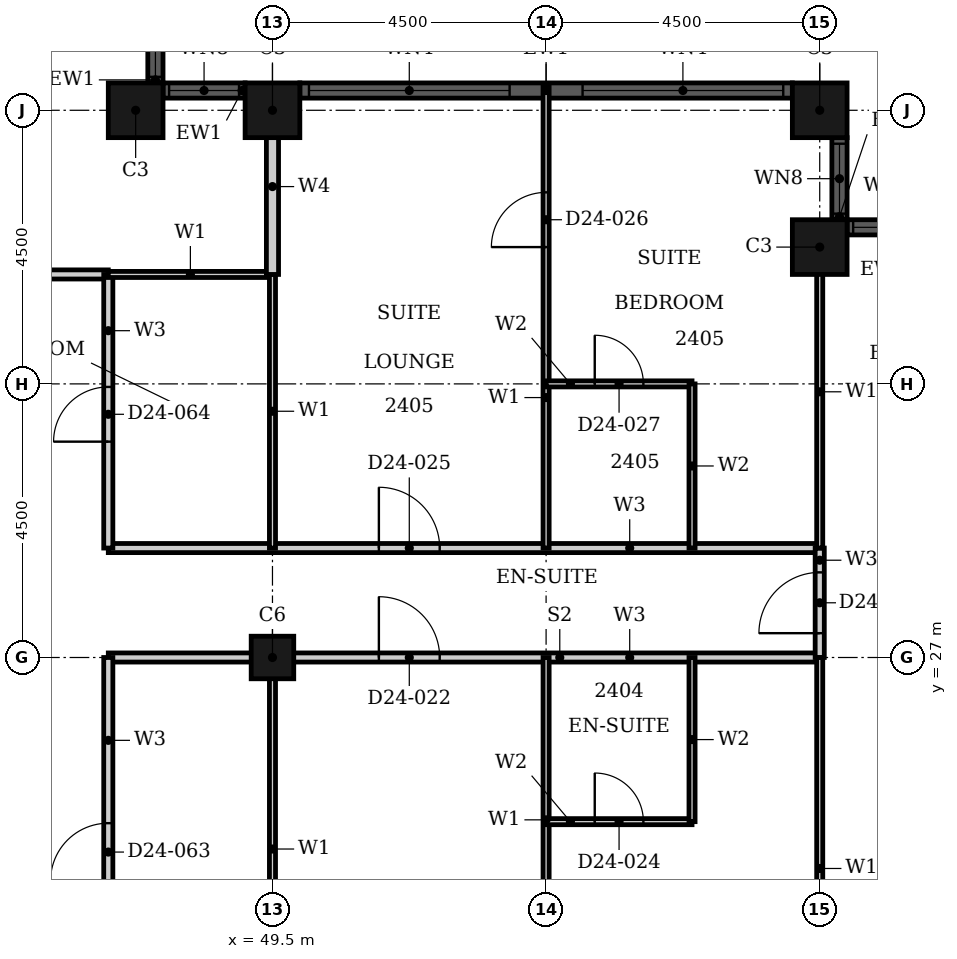
"""IFC4 building model, lengths in metres.
Left out: names, types, materials, properties, quantities, classifications, styles, units other than length and angle.
Written with IfcOpenShell. Run it as: python <this file> out.ifc"""

import sys

from ifc_helpers import new_model, si_unit, direction, frame, frame_2d, origin, origin_2d, place, context, subcontext, project, spatial, rectangle, hollow_rectangle, extrude, element, fill, save


model = new_model("IFC4")
c1 = context("Model", 3, precision=1e-05, world=origin(), true_north=direction((0.0, 1.0)))
c2 = subcontext(c1, "Body", "Model", "MODEL_VIEW")
j1 = project(units=[si_unit("LENGTHUNIT", "METRE"), si_unit("PLANEANGLEUNIT", "RADIAN")], contexts=[c1])
p1 = place(None, origin())
s1 = spatial("IfcSite", under=j1, at=p1, CompositionType="ELEMENT")
p2 = place(p1, origin())
s2 = spatial("IfcBuilding", under=s1, at=p2, CompositionType="ELEMENT")
p3 = place(p2, frame((0.0, 0.0, 100.8)))
s3 = spatial("IfcBuildingStorey", under=s2, at=p3, CompositionType="ELEMENT", Elevation=100.8)
for number, where, z_axis, x_axis in (
    (1, (58.5, 33.75, 0.0), (0.0, 0.0, 1.0), (1.0, 0.0, 0.0)),
    (2, (58.5, 36.0, 0.0), (0.0, 0.0, 1.0), (1.0, 0.0, 0.0)),
    (3, (49.5, 36.0, 0.0), (0.0, 0.0, 1.0), (1.0, 0.0, 0.0)),
    (4, (47.25, 36.0, 0.0), (0.0, 0.0, 1.0), (1.0, 0.0, 0.0)),
):
    element("IfcColumn", number, at=place(p3, frame(where, z_axis=z_axis, x_axis=x_axis)), inside=s3, PredefinedType="COLUMN", context=c2, shape_type="SweptSolid", body=[
        extrude(hollow_rectangle(XDim=0.9, YDim=0.9, WallThickness=0.028, at=origin_2d()), origin(), (0.0, 0.0, 1.0), 3.6),
    ])
p4 = place(p3, frame((49.5, 27.0, 0.0), z_axis=(0.0, 0.0, 1.0), x_axis=(1.0, 0.0, 0.0)))
e5 = element("IfcColumn", 5, at=p4, inside=s3, PredefinedType="COLUMN", context=c2, shape_type="SweptSolid", body=[
    extrude(hollow_rectangle(XDim=0.7, YDim=0.7, WallThickness=0.022, at=origin_2d()), origin(), (0.0, 0.0, 1.0), 3.6),
])
p5 = place(p3, frame((60.3, 34.075, 0.0), z_axis=(0.0, 0.0, 1.0), x_axis=(-1.0, 0.0, 0.0)))
e6 = element("IfcWall", 6, at=p5, inside=s3, PredefinedType="SOLIDWALL", context=c2, shape_type="SweptSolid", body=[
    extrude(rectangle(XDim=1.35, YDim=0.25, at=frame_2d((0.675, 0.0))), origin(), (0.0, 0.0, 1.0), 3.6),
])
p6 = place(p5, frame((0.1, 0.0, 0.9)))
e7 = element("IfcOpeningElement", 7, at=p6, cuts=e6, PredefinedType="OPENING", context=c2, shape_type="SweptSolid", body=[
    extrude(rectangle(XDim=1.15, YDim=2.08, at=frame_2d((0.575, 1.04))), frame((0.0, 0.135, 0.0), z_axis=(0.0, -1.0, 0.0), x_axis=(1.0, 0.0, 0.0)), (0.0, 0.0, 1.0), 0.27),
])
p7 = place(p3, frame((58.825, 34.2, 0.0), z_axis=(0.0, 0.0, 1.0), x_axis=(0.0, 1.0, 0.0)))
e8 = element("IfcWall", 8, at=p7, inside=s3, PredefinedType="SOLIDWALL", context=c2, shape_type="SweptSolid", body=[
    extrude(rectangle(XDim=1.35, YDim=0.25, at=frame_2d((0.675, 0.0))), origin(), (0.0, 0.0, 1.0), 3.6),
])
p8 = place(p7, frame((0.1, 0.0, 0.9)))
e9 = element("IfcOpeningElement", 9, at=p8, cuts=e8, PredefinedType="OPENING", context=c2, shape_type="SweptSolid", body=[
    extrude(rectangle(XDim=1.15, YDim=2.08, at=frame_2d((0.575, 1.04))), frame((0.0, 0.135, 0.0), z_axis=(0.0, -1.0, 0.0), x_axis=(1.0, 0.0, 0.0)), (0.0, 0.0, 1.0), 0.27),
])
p9 = place(p3, frame((58.05, 36.325, 0.0), z_axis=(0.0, 0.0, 1.0), x_axis=(-1.0, 0.0, 0.0)))
e10 = element("IfcWall", 10, at=p9, inside=s3, PredefinedType="SOLIDWALL", context=c2, shape_type="SweptSolid", body=[
    extrude(rectangle(XDim=8.1, YDim=0.25, at=frame_2d((4.05, 0.0))), origin(), (0.0, 0.0, 1.0), 3.6),
])
p10 = place(p9, frame((0.15, 0.0, 0.9)))
e11 = element("IfcOpeningElement", 11, at=p10, cuts=e10, PredefinedType="OPENING", context=c2, shape_type="SweptSolid", body=[
    extrude(rectangle(XDim=3.3, YDim=2.08, at=frame_2d((1.65, 1.04))), frame((0.0, 0.135, 0.0), z_axis=(0.0, -1.0, 0.0), x_axis=(1.0, 0.0, 0.0)), (0.0, 0.0, 1.0), 0.27),
])
p11 = place(p9, frame((4.65, 0.0, 0.9)))
e12 = element("IfcOpeningElement", 12, at=p11, cuts=e10, PredefinedType="OPENING", context=c2, shape_type="SweptSolid", body=[
    extrude(rectangle(XDim=3.3, YDim=2.08, at=frame_2d((1.65, 1.04))), frame((0.0, 0.135, 0.0), z_axis=(0.0, -1.0, 0.0), x_axis=(1.0, 0.0, 0.0)), (0.0, 0.0, 1.0), 0.27),
])
p12 = place(p3, frame((49.05, 36.325, 0.0), z_axis=(0.0, 0.0, 1.0), x_axis=(-1.0, 0.0, 0.0)))
e13 = element("IfcWall", 13, at=p12, inside=s3, PredefinedType="SOLIDWALL", context=c2, shape_type="SweptSolid", body=[
    extrude(rectangle(XDim=1.35, YDim=0.25, at=frame_2d((0.675, 0.0))), origin(), (0.0, 0.0, 1.0), 3.6),
])
p13 = place(p12, frame((0.1, 0.0, 0.9)))
e14 = element("IfcOpeningElement", 14, at=p13, cuts=e13, PredefinedType="OPENING", context=c2, shape_type="SweptSolid", body=[
    extrude(rectangle(XDim=1.15, YDim=2.08, at=frame_2d((0.575, 1.04))), frame((0.0, 0.135, 0.0), z_axis=(0.0, -1.0, 0.0), x_axis=(1.0, 0.0, 0.0)), (0.0, 0.0, 1.0), 0.27),
])
p14 = place(p3, frame((47.575, 36.45, 0.0), z_axis=(0.0, 0.0, 1.0), x_axis=(0.0, 1.0, 0.0)))
e15 = element("IfcWall", 15, at=p14, inside=s3, PredefinedType="SOLIDWALL", context=c2, shape_type="SweptSolid", body=[
    extrude(rectangle(XDim=1.35, YDim=0.25, at=frame_2d((0.675, 0.0))), origin(), (0.0, 0.0, 1.0), 3.6),
])
p15 = place(p14, frame((0.1, 0.0, 0.9)))
e16 = element("IfcOpeningElement", 16, at=p15, cuts=e15, PredefinedType="OPENING", context=c2, shape_type="SweptSolid", body=[
    extrude(rectangle(XDim=1.15, YDim=2.08, at=frame_2d((0.575, 1.04))), frame((0.0, 0.135, 0.0), z_axis=(0.0, -1.0, 0.0), x_axis=(1.0, 0.0, 0.0)), (0.0, 0.0, 1.0), 0.27),
])
p16 = place(p3, frame((46.8, 27.0, 0.0), z_axis=(0.0, 0.0, 1.0), x_axis=(1.0, 0.0, 0.0)))
e17 = element("IfcWall", 17, at=p16, inside=s3, PredefinedType="PARTITIONING", context=c2, shape_type="SweptSolid", body=[
    extrude(rectangle(XDim=11.7, YDim=0.15, at=frame_2d((5.85, 0.0))), origin(), (0.0, 0.0, 1.0), 2.58),
])
p17 = place(p16, frame((4.45, 0.0, 0.0)))
e18 = element("IfcOpeningElement", 18, at=p17, cuts=e17, PredefinedType="OPENING", context=c2, shape_type="SweptSolid", body=[
    extrude(rectangle(XDim=1.0, YDim=2.1, at=frame_2d((0.5, 1.05))), frame((0.0, 0.085, 0.0), z_axis=(0.0, -1.0, 0.0), x_axis=(1.0, 0.0, 0.0)), (0.0, 0.0, 1.0), 0.17),
])
p18 = place(p3, frame((46.8, 28.8, 0.0), z_axis=(0.0, 0.0, 1.0), x_axis=(1.0, 0.0, 0.0)))
e19 = element("IfcWall", 19, at=p18, inside=s3, PredefinedType="PARTITIONING", context=c2, shape_type="SweptSolid", body=[
    extrude(rectangle(XDim=11.7, YDim=0.15, at=frame_2d((5.85, 0.0))), origin(), (0.0, 0.0, 1.0), 3.3),
])
p19 = place(p18, frame((4.45, 0.0, 0.0)))
e20 = element("IfcOpeningElement", 20, at=p19, cuts=e19, PredefinedType="OPENING", context=c2, shape_type="SweptSolid", body=[
    extrude(rectangle(XDim=1.0, YDim=2.1, at=frame_2d((0.5, 1.05))), frame((0.0, 0.085, 0.0), z_axis=(0.0, -1.0, 0.0), x_axis=(1.0, 0.0, 0.0)), (0.0, 0.0, 1.0), 0.17),
])
p20 = place(p3, frame((33.3, 33.3, 0.0), z_axis=(0.0, 0.0, 1.0), x_axis=(1.0, 0.0, 0.0)))
e21 = element("IfcWall", 21, at=p20, inside=s3, PredefinedType="PARTITIONING", context=c2, shape_type="SweptSolid", body=[
    extrude(rectangle(XDim=13.5, YDim=0.15, at=frame_2d((6.75, 0.0))), origin(), (0.0, 0.0, 1.0), 3.3),
])
p21 = place(p20, frame((10.15, 0.0, 0.0)))
e22 = element("IfcOpeningElement", 22, at=p21, cuts=e21, PredefinedType="OPENING", context=c2, shape_type="SweptSolid", body=[
    extrude(rectangle(XDim=1.0, YDim=2.1, at=frame_2d((0.5, 1.05))), frame((0.0, 0.085, 0.0), z_axis=(0.0, -1.0, 0.0), x_axis=(1.0, 0.0, 0.0)), (0.0, 0.0, 1.0), 0.17),
])
p22 = place(p20, frame((0.75, 0.0, 0.0)))
e23 = element("IfcOpeningElement", 23, at=p22, cuts=e21, PredefinedType="OPENING", context=c2, shape_type="SweptSolid", body=[
    extrude(rectangle(XDim=0.9, YDim=2.1, at=frame_2d((0.45, 1.05))), frame((0.0, 0.085, 0.0), z_axis=(0.0, -1.0, 0.0), x_axis=(1.0, 0.0, 0.0)), (0.0, 0.0, 1.0), 0.17),
])
p23 = place(p20, frame((4.35, 0.0, 0.0)))
e24 = element("IfcOpeningElement", 24, at=p23, cuts=e21, PredefinedType="OPENING", context=c2, shape_type="SweptSolid", body=[
    extrude(rectangle(XDim=0.9, YDim=2.1, at=frame_2d((0.45, 1.05))), frame((0.0, 0.085, 0.0), z_axis=(0.0, -1.0, 0.0), x_axis=(1.0, 0.0, 0.0)), (0.0, 0.0, 1.0), 0.17),
])
p24 = place(p3, frame((46.8, 28.8, 0.0), z_axis=(0.0, 0.0, 1.0), x_axis=(0.0, 1.0, 0.0)))
e25 = element("IfcWall", 25, at=p24, inside=s3, PredefinedType="PARTITIONING", context=c2, shape_type="SweptSolid", body=[
    extrude(rectangle(XDim=4.5, YDim=0.15, at=frame_2d((2.25, 0.0))), origin(), (0.0, 0.0, 1.0), 3.3),
])
p25 = place(p24, frame((1.75, 0.0, 0.0)))
e26 = element("IfcOpeningElement", 26, at=p25, cuts=e25, PredefinedType="OPENING", context=c2, shape_type="SweptSolid", body=[
    extrude(rectangle(XDim=0.9, YDim=2.1, at=frame_2d((0.45, 1.05))), frame((0.0, 0.085, 0.0), z_axis=(0.0, -1.0, 0.0), x_axis=(1.0, 0.0, 0.0)), (0.0, 0.0, 1.0), 0.17),
])
p26 = place(p3, frame((46.8, 20.7, 0.0), z_axis=(0.0, 0.0, 1.0), x_axis=(0.0, 1.0, 0.0)))
e27 = element("IfcWall", 27, at=p26, inside=s3, PredefinedType="PARTITIONING", context=c2, shape_type="SweptSolid", body=[
    extrude(rectangle(XDim=6.3, YDim=0.15, at=frame_2d((3.15, 0.0))), origin(), (0.0, 0.0, 1.0), 3.3),
])
p27 = place(p26, frame((2.625, 0.0, 0.0)))
e28 = element("IfcOpeningElement", 28, at=p27, cuts=e27, PredefinedType="OPENING", context=c2, shape_type="SweptSolid", body=[
    extrude(rectangle(XDim=0.95, YDim=2.1, at=frame_2d((0.475, 1.05))), frame((0.0, 0.085, 0.0), z_axis=(0.0, -1.0, 0.0), x_axis=(1.0, 0.0, 0.0)), (0.0, 0.0, 1.0), 0.17),
])
p28 = place(p3, frame((58.5, 27.0, 0.0), z_axis=(0.0, 0.0, 1.0), x_axis=(0.0, 1.0, 0.0)))
e29 = element("IfcWall", 29, at=p28, inside=s3, PredefinedType="PARTITIONING", context=c2, shape_type="SweptSolid", body=[
    extrude(rectangle(XDim=1.8, YDim=0.15, at=frame_2d((0.9, 0.0))), origin(), (0.0, 0.0, 1.0), 3.3),
])
p29 = place(p28, frame((0.4, 0.0, 0.0)))
e30 = element("IfcOpeningElement", 30, at=p29, cuts=e29, PredefinedType="OPENING", context=c2, shape_type="SweptSolid", body=[
    extrude(rectangle(XDim=1.0, YDim=2.1, at=frame_2d((0.5, 1.05))), frame((0.0, 0.085, 0.0), z_axis=(0.0, -1.0, 0.0), x_axis=(1.0, 0.0, 0.0)), (0.0, 0.0, 1.0), 0.17),
])
p30 = place(p3, frame((46.8, 33.3, 0.0), z_axis=(0.0, 0.0, 1.0), x_axis=(1.0, 0.0, 0.0)))
e31 = element("IfcWall", 31, at=p30, inside=s3, PredefinedType="PARTITIONING", context=c2, shape_type="SweptSolid", body=[
    extrude(rectangle(XDim=2.7, YDim=0.1, at=frame_2d((1.35, 0.0))), origin(), (0.0, 0.0, 1.0), 3.3),
])
p31 = place(p3, frame((49.5, 28.8, 0.0), z_axis=(0.0, 0.0, 1.0), x_axis=(0.0, 1.0, 0.0)))
e32 = element("IfcWall", 32, at=p31, inside=s3, PredefinedType="PARTITIONING", context=c2, shape_type="SweptSolid", body=[
    extrude(rectangle(XDim=4.5, YDim=0.1, at=frame_2d((2.25, 0.0))), origin(), (0.0, 0.0, 1.0), 2.38),
])
p32 = place(p3, frame((49.5, 20.7, 0.0), z_axis=(0.0, 0.0, 1.0), x_axis=(0.0, 1.0, 0.0)))
e33 = element("IfcWall", 33, at=p32, inside=s3, PredefinedType="PARTITIONING", context=c2, shape_type="SweptSolid", body=[
    extrude(rectangle(XDim=6.3, YDim=0.1, at=frame_2d((3.15, 0.0))), origin(), (0.0, 0.0, 1.0), 2.38),
])
p33 = place(p3, frame((54.0, 28.8, 0.0), z_axis=(0.0, 0.0, 1.0), x_axis=(0.0, 1.0, 0.0)))
e34 = element("IfcWall", 34, at=p33, inside=s3, PredefinedType="PARTITIONING", context=c2, shape_type="SweptSolid", body=[
    extrude(rectangle(XDim=7.59, YDim=0.1, at=frame_2d((3.795, 0.0))), origin(), (0.0, 0.0, 1.0), 3.3),
])
p34 = place(p33, frame((4.95, 0.0, 0.0)))
e35 = element("IfcOpeningElement", 35, at=p34, cuts=e34, PredefinedType="OPENING", context=c2, shape_type="SweptSolid", body=[
    extrude(rectangle(XDim=0.9, YDim=2.1, at=frame_2d((0.45, 1.05))), frame((0.0, 0.06, 0.0), z_axis=(0.0, -1.0, 0.0), x_axis=(1.0, 0.0, 0.0)), (0.0, 0.0, 1.0), 0.12),
])
p35 = place(p3, frame((54.0, 17.61, 0.0), z_axis=(0.0, 0.0, 1.0), x_axis=(0.0, 1.0, 0.0)))
e36 = element("IfcWall", 36, at=p35, inside=s3, PredefinedType="PARTITIONING", context=c2, shape_type="SweptSolid", body=[
    extrude(rectangle(XDim=9.39, YDim=0.1, at=frame_2d((4.695, 0.0))), origin(), (0.0, 0.0, 1.0), 3.3),
])
p36 = place(p35, frame((3.15, 0.0, 0.0)))
e37 = element("IfcOpeningElement", 37, at=p36, cuts=e36, PredefinedType="OPENING", context=c2, shape_type="SweptSolid", body=[
    extrude(rectangle(XDim=0.9, YDim=2.1, at=frame_2d((0.45, 1.05))), frame((0.0, 0.06, 0.0), z_axis=(0.0, -1.0, 0.0), x_axis=(1.0, 0.0, 0.0)), (0.0, 0.0, 1.0), 0.12),
])
p37 = place(p3, frame((58.5, 28.8, 0.0), z_axis=(0.0, 0.0, 1.0), x_axis=(0.0, 1.0, 0.0)))
e38 = element("IfcWall", 38, at=p37, inside=s3, PredefinedType="PARTITIONING", context=c2, shape_type="SweptSolid", body=[
    extrude(rectangle(XDim=5.14, YDim=0.1, at=frame_2d((2.57, 0.0))), origin(), (0.0, 0.0, 1.0), 3.3),
])
p38 = place(p3, frame((58.5, 20.06, 0.0), z_axis=(0.0, 0.0, 1.0), x_axis=(0.0, 1.0, 0.0)))
e39 = element("IfcWall", 39, at=p38, inside=s3, PredefinedType="PARTITIONING", context=c2, shape_type="SweptSolid", body=[
    extrude(rectangle(XDim=6.94, YDim=0.1, at=frame_2d((3.47, 0.0))), origin(), (0.0, 0.0, 1.0), 3.3),
])
p39 = place(p3, frame((49.5, 33.3, 0.0), z_axis=(0.0, 0.0, 1.0), x_axis=(0.0, 1.0, 0.0)))
e40 = element("IfcWall", 40, at=p39, inside=s3, PredefinedType="PARTITIONING", context=c2, shape_type="SweptSolid", body=[
    extrude(rectangle(XDim=2.89, YDim=0.2, at=frame_2d((1.445, 0.0))), origin(), (0.0, 0.0, 1.0), 2.38),
])
p40 = place(p3, frame((54.0, 24.3, 0.0), z_axis=(0.0, 0.0, 1.0), x_axis=(1.0, 0.0, 0.0)))
e41 = element("IfcWall", 41, at=p40, inside=s3, PredefinedType="PARTITIONING", context=c2, shape_type="SweptSolid", body=[
    extrude(rectangle(XDim=2.4, YDim=0.1, at=frame_2d((1.2, 0.0))), origin(), (0.0, 0.0, 1.0), 3.3),
])
p41 = place(p40, frame((0.8, 0.0, 0.0)))
e42 = element("IfcOpeningElement", 42, at=p41, cuts=e41, PredefinedType="OPENING", context=c2, shape_type="SweptSolid", body=[
    extrude(rectangle(XDim=0.8, YDim=2.1, at=frame_2d((0.4, 1.05))), frame((0.0, 0.06, 0.0), z_axis=(0.0, -1.0, 0.0), x_axis=(1.0, 0.0, 0.0)), (0.0, 0.0, 1.0), 0.12),
])
p42 = place(p3, frame((54.0, 31.5, 0.0), z_axis=(0.0, 0.0, 1.0), x_axis=(1.0, 0.0, 0.0)))
e43 = element("IfcWall", 43, at=p42, inside=s3, PredefinedType="PARTITIONING", context=c2, shape_type="SweptSolid", body=[
    extrude(rectangle(XDim=2.4, YDim=0.1, at=frame_2d((1.2, 0.0))), origin(), (0.0, 0.0, 1.0), 2.58),
])
p43 = place(p42, frame((0.8, 0.0, 0.0)))
e44 = element("IfcOpeningElement", 44, at=p43, cuts=e43, PredefinedType="OPENING", context=c2, shape_type="SweptSolid", body=[
    extrude(rectangle(XDim=0.8, YDim=2.1, at=frame_2d((0.4, 1.05))), frame((0.0, 0.06, 0.0), z_axis=(0.0, -1.0, 0.0), x_axis=(1.0, 0.0, 0.0)), (0.0, 0.0, 1.0), 0.12),
])
for number, where, z_axis, x_axis in (
    (45, (56.4, 28.8, 0.0), (0.0, 0.0, 1.0), (0.0, 1.0, 0.0)),
    (46, (56.4, 24.3, 0.0), (0.0, 0.0, 1.0), (0.0, 1.0, 0.0)),
):
    element("IfcWall", number, at=place(p3, frame(where, z_axis=z_axis, x_axis=x_axis)), inside=s3, PredefinedType="PARTITIONING", context=c2, shape_type="SweptSolid", body=[
        extrude(rectangle(XDim=2.7, YDim=0.1, at=frame_2d((1.35, 0.0))), origin(), (0.0, 0.0, 1.0), 3.3),
    ])
p44 = place(p6, origin())
e47 = element("IfcWindow", 47, at=p44, inside=s3, PartitioningType="SINGLE_PANEL", PredefinedType="WINDOW", context=c2, shape_type="SweptSolid", body=[
    extrude(rectangle(XDim=1.15, YDim=2.08, at=frame_2d((0.575, 1.04))), frame((0.0, 0.03, 0.0), z_axis=(0.0, -1.0, 0.0), x_axis=(1.0, 0.0, 0.0)), (0.0, 0.0, 1.0), 0.06),
])
fill(e7, e47)
p45 = place(p8, origin())
e48 = element("IfcWindow", 48, at=p45, inside=s3, PartitioningType="SINGLE_PANEL", PredefinedType="WINDOW", context=c2, shape_type="SweptSolid", body=[
    extrude(rectangle(XDim=1.15, YDim=2.08, at=frame_2d((0.575, 1.04))), frame((0.0, 0.03, 0.0), z_axis=(0.0, -1.0, 0.0), x_axis=(1.0, 0.0, 0.0)), (0.0, 0.0, 1.0), 0.06),
])
fill(e9, e48)
p46 = place(p10, origin())
e49 = element("IfcWindow", 49, at=p46, inside=s3, PartitioningType="SINGLE_PANEL", PredefinedType="WINDOW", context=c2, shape_type="SweptSolid", body=[
    extrude(rectangle(XDim=3.3, YDim=2.08, at=frame_2d((1.65, 1.04))), frame((0.0, 0.03, 0.0), z_axis=(0.0, -1.0, 0.0), x_axis=(1.0, 0.0, 0.0)), (0.0, 0.0, 1.0), 0.06),
])
fill(e11, e49)
p47 = place(p11, origin())
e50 = element("IfcWindow", 50, at=p47, inside=s3, PartitioningType="SINGLE_PANEL", PredefinedType="WINDOW", context=c2, shape_type="SweptSolid", body=[
    extrude(rectangle(XDim=3.3, YDim=2.08, at=frame_2d((1.65, 1.04))), frame((0.0, 0.03, 0.0), z_axis=(0.0, -1.0, 0.0), x_axis=(1.0, 0.0, 0.0)), (0.0, 0.0, 1.0), 0.06),
])
fill(e12, e50)
p48 = place(p13, origin())
e51 = element("IfcWindow", 51, at=p48, inside=s3, PartitioningType="SINGLE_PANEL", PredefinedType="WINDOW", context=c2, shape_type="SweptSolid", body=[
    extrude(rectangle(XDim=1.15, YDim=2.08, at=frame_2d((0.575, 1.04))), frame((0.0, 0.03, 0.0), z_axis=(0.0, -1.0, 0.0), x_axis=(1.0, 0.0, 0.0)), (0.0, 0.0, 1.0), 0.06),
])
fill(e14, e51)
p49 = place(p15, origin())
e52 = element("IfcWindow", 52, at=p49, inside=s3, PartitioningType="SINGLE_PANEL", PredefinedType="WINDOW", context=c2, shape_type="SweptSolid", body=[
    extrude(rectangle(XDim=1.15, YDim=2.08, at=frame_2d((0.575, 1.04))), frame((0.0, 0.03, 0.0), z_axis=(0.0, -1.0, 0.0), x_axis=(1.0, 0.0, 0.0)), (0.0, 0.0, 1.0), 0.06),
])
fill(e16, e52)
p50 = place(p17, origin())
e53 = element("IfcDoor", 53, at=p50, inside=s3, OperationType="SINGLE_SWING_RIGHT", PredefinedType="DOOR", context=c2, shape_type="SweptSolid", body=[
    extrude(rectangle(XDim=1.0, YDim=2.1, at=frame_2d((0.5, 1.05))), frame((0.0, 0.025, 0.0), z_axis=(0.0, -1.0, 0.0), x_axis=(1.0, 0.0, 0.0)), (0.0, 0.0, 1.0), 0.05),
])
fill(e18, e53)
p51 = place(p41, origin())
e54 = element("IfcDoor", 54, at=p51, inside=s3, OperationType="SINGLE_SWING_RIGHT", PredefinedType="DOOR", context=c2, shape_type="SweptSolid", body=[
    extrude(rectangle(XDim=0.8, YDim=2.1, at=frame_2d((0.4, 1.05))), frame((0.0, 0.025, 0.0), z_axis=(0.0, -1.0, 0.0), x_axis=(1.0, 0.0, 0.0)), (0.0, 0.0, 1.0), 0.05),
])
fill(e42, e54)
p52 = place(p19, origin())
e55 = element("IfcDoor", 55, at=p52, inside=s3, OperationType="SINGLE_SWING_LEFT", PredefinedType="DOOR", context=c2, shape_type="SweptSolid", body=[
    extrude(rectangle(XDim=1.0, YDim=2.1, at=frame_2d((0.5, 1.05))), frame((0.0, 0.025, 0.0), z_axis=(0.0, -1.0, 0.0), x_axis=(1.0, 0.0, 0.0)), (0.0, 0.0, 1.0), 0.05),
])
fill(e20, e55)
p53 = place(p34, origin())
e56 = element("IfcDoor", 56, at=p53, inside=s3, OperationType="SINGLE_SWING_RIGHT", PredefinedType="DOOR", context=c2, shape_type="SweptSolid", body=[
    extrude(rectangle(XDim=0.9, YDim=2.1, at=frame_2d((0.45, 1.05))), frame((0.0, 0.025, 0.0), z_axis=(0.0, -1.0, 0.0), x_axis=(1.0, 0.0, 0.0)), (0.0, 0.0, 1.0), 0.05),
])
fill(e35, e56)
p54 = place(p43, origin())
e57 = element("IfcDoor", 57, at=p54, inside=s3, OperationType="SINGLE_SWING_LEFT", PredefinedType="DOOR", context=c2, shape_type="SweptSolid", body=[
    extrude(rectangle(XDim=0.8, YDim=2.1, at=frame_2d((0.4, 1.05))), frame((0.0, 0.025, 0.0), z_axis=(0.0, -1.0, 0.0), x_axis=(1.0, 0.0, 0.0)), (0.0, 0.0, 1.0), 0.05),
])
fill(e44, e57)
p55 = place(p29, origin())
e58 = element("IfcDoor", 58, at=p55, inside=s3, OperationType="SINGLE_SWING_LEFT", PredefinedType="DOOR", context=c2, shape_type="SweptSolid", body=[
    extrude(rectangle(XDim=1.0, YDim=2.1, at=frame_2d((0.5, 1.05))), frame((0.0, 0.025, 0.0), z_axis=(0.0, -1.0, 0.0), x_axis=(1.0, 0.0, 0.0)), (0.0, 0.0, 1.0), 0.05),
])
fill(e30, e58)
p56 = place(p27, origin())
e59 = element("IfcDoor", 59, at=p56, inside=s3, OperationType="SINGLE_SWING_LEFT", PredefinedType="DOOR", context=c2, shape_type="SweptSolid", body=[
    extrude(rectangle(XDim=0.95, YDim=2.1, at=frame_2d((0.475, 1.05))), frame((0.0, 0.025, 0.0), z_axis=(0.0, -1.0, 0.0), x_axis=(1.0, 0.0, 0.0)), (0.0, 0.0, 1.0), 0.05),
])
fill(e28, e59)
p57 = place(p25, origin())
e60 = element("IfcDoor", 60, at=p57, inside=s3, OperationType="SINGLE_SWING_LEFT", PredefinedType="DOOR", context=c2, shape_type="SweptSolid", body=[
    extrude(rectangle(XDim=0.9, YDim=2.1, at=frame_2d((0.45, 1.05))), frame((0.0, 0.025, 0.0), z_axis=(0.0, -1.0, 0.0), x_axis=(1.0, 0.0, 0.0)), (0.0, 0.0, 1.0), 0.05),
])
fill(e26, e60)
save(model, sys.argv[1])
